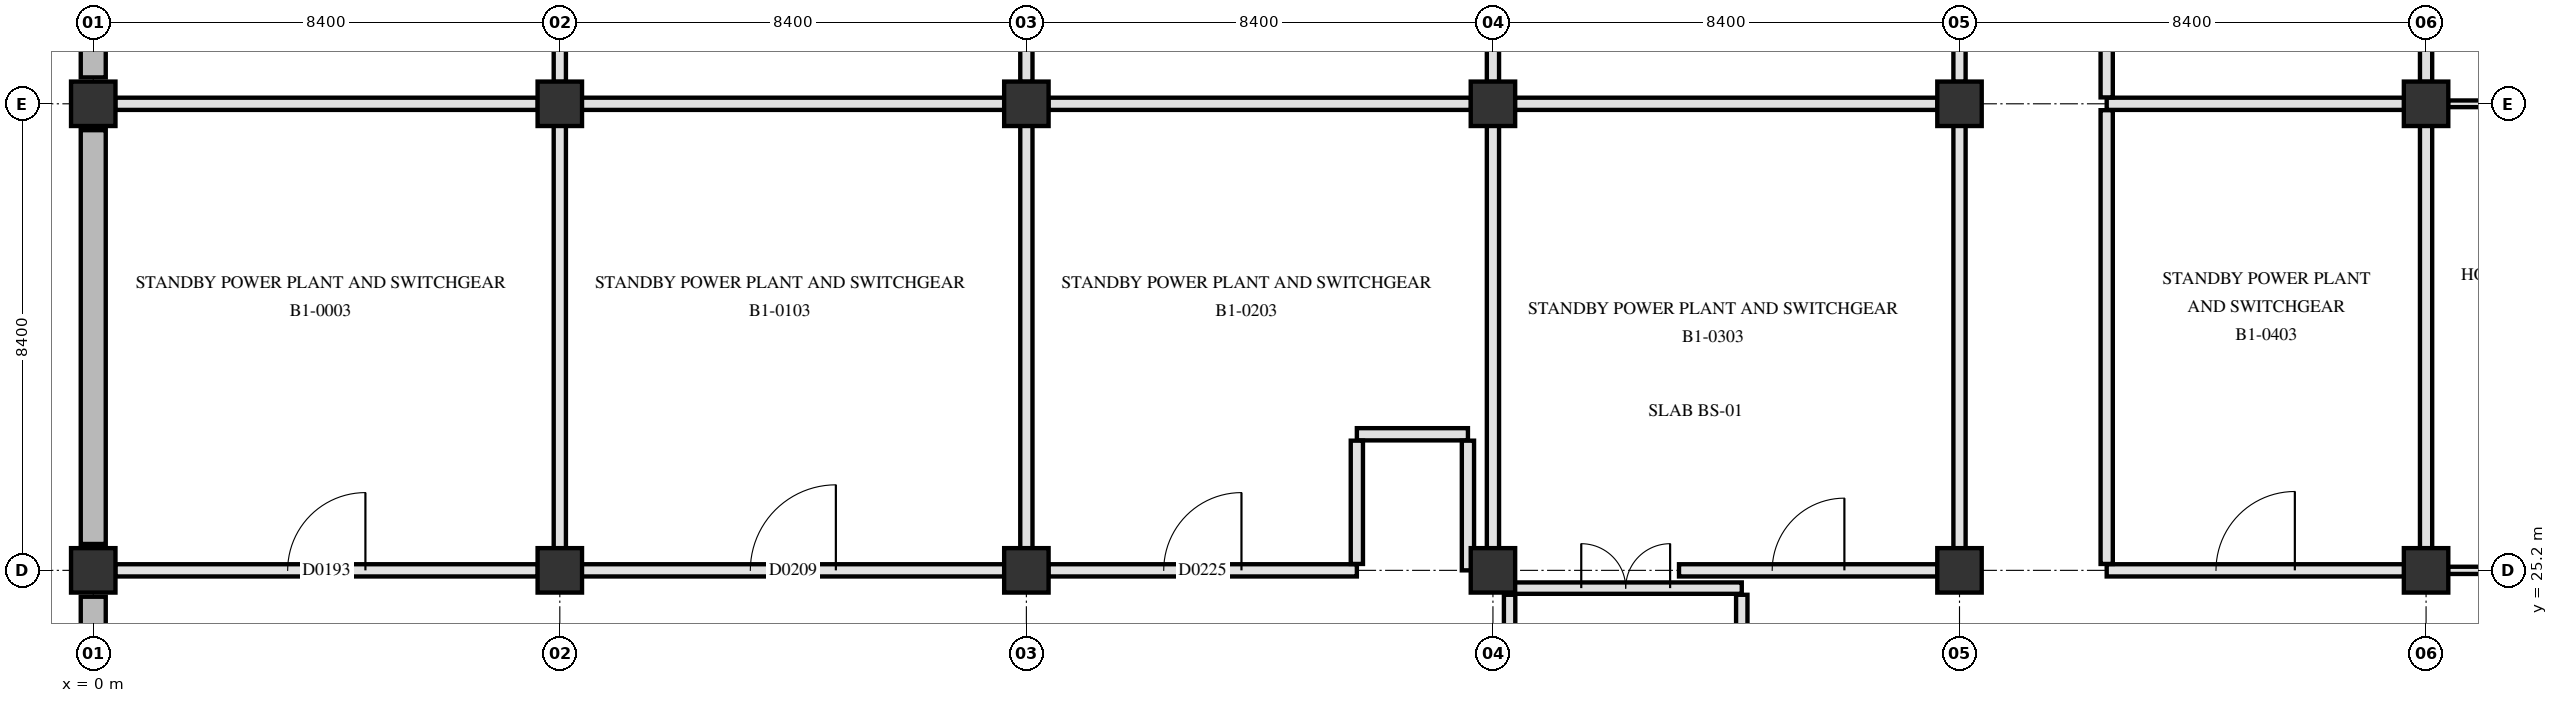
"""IFC4 building model, lengths in metres.
Left out: names, types, materials, properties, quantities, classifications, styles, units other than length and angle.
Written with IfcOpenShell. Run it as: python <this file> out.ifc"""

import sys

from ifc_helpers import new_model, si_unit, direction, frame, frame_2d, origin, origin_2d, place, context, subcontext, project, spatial, rectangle, extrude, element, fill, save


model = new_model("IFC4")
c1 = context("Model", 3, precision=1e-05, world=origin(), true_north=direction((0.0, 1.0)))
c2 = subcontext(c1, "Body", "Model", "MODEL_VIEW")
j1 = project(units=[si_unit("LENGTHUNIT", "METRE"), si_unit("PLANEANGLEUNIT", "RADIAN")], contexts=[c1])
p1 = place(None, origin())
s1 = spatial("IfcSite", under=j1, at=p1, CompositionType="ELEMENT")
p2 = place(p1, origin())
s2 = spatial("IfcBuilding", under=s1, at=p2, CompositionType="ELEMENT")
p3 = place(p2, frame((0.0, 0.0, -5.4)))
s3 = spatial("IfcBuildingStorey", under=s2, at=p3, CompositionType="ELEMENT", Elevation=-5.4)
for number, where, z_axis, x_axis in (
    (1, (0.0, 25.2, 0.0), (0.0, 0.0, 1.0), (1.0, 0.0, 0.0)),
    (2, (0.0, 33.6, 0.0), (0.0, 0.0, 1.0), (1.0, 0.0, 0.0)),
    (3, (8.4, 25.2, 0.0), (0.0, 0.0, 1.0), (1.0, 0.0, 0.0)),
    (4, (8.4, 33.6, 0.0), (0.0, 0.0, 1.0), (1.0, 0.0, 0.0)),
    (5, (16.8, 25.2, 0.0), (0.0, 0.0, 1.0), (1.0, 0.0, 0.0)),
    (6, (16.8, 33.6, 0.0), (0.0, 0.0, 1.0), (1.0, 0.0, 0.0)),
    (7, (25.2, 25.2, 0.0), (0.0, 0.0, 1.0), (1.0, 0.0, 0.0)),
    (8, (25.2, 33.6, 0.0), (0.0, 0.0, 1.0), (1.0, 0.0, 0.0)),
    (9, (33.6, 25.2, 0.0), (0.0, 0.0, 1.0), (1.0, 0.0, 0.0)),
    (10, (33.6, 33.6, 0.0), (0.0, 0.0, 1.0), (1.0, 0.0, 0.0)),
    (11, (42.0, 25.2, 0.0), (0.0, 0.0, 1.0), (1.0, 0.0, 0.0)),
    (12, (42.0, 33.6, 0.0), (0.0, 0.0, 1.0), (1.0, 0.0, 0.0)),
):
    element("IfcColumn", number, at=place(p3, frame(where, z_axis=z_axis, x_axis=x_axis)), inside=s3, PredefinedType="COLUMN", context=c2, shape_type="SweptSolid", body=[
        extrude(rectangle(XDim=0.8, YDim=0.8, at=origin_2d()), origin(), (0.0, 0.0, 1.0), 5.4),
    ])
p4 = place(p3, frame((0.0, 17.275, 0.0), z_axis=(0.0, 0.0, 1.0), x_axis=(0.0, 1.0, 0.0)))
e13 = element("IfcWall", 13, at=p4, inside=s3, PredefinedType="SOLIDWALL", context=c2, shape_type="SweptSolid", body=[
    extrude(rectangle(XDim=7.45, YDim=0.45, at=frame_2d((3.725, 0.0))), origin(), (0.0, 0.0, 1.0), 5.08),
])
for number, where, z_axis, x_axis in (
    (14, (0.0, 25.675, 0.0), (0.0, 0.0, 1.0), (0.0, 1.0, 0.0)),
    (15, (0.0, 34.075, 0.0), (0.0, 0.0, 1.0), (0.0, 1.0, 0.0)),
):
    element("IfcWall", number, at=place(p3, frame(where, z_axis=z_axis, x_axis=x_axis)), inside=s3, PredefinedType="SOLIDWALL", context=c2, shape_type="SweptSolid", body=[
        extrude(rectangle(XDim=7.45, YDim=0.45, at=frame_2d((3.725, 0.0))), origin(), (0.0, 0.0, 1.0), 5.08),
    ])
p5 = place(p3, frame((29.68, 20.64, 0.0), z_axis=(0.0, 0.0, 1.0), x_axis=(0.0, 1.0, 0.0)))
e16 = element("IfcWall", 16, at=p5, inside=s3, PredefinedType="PARTITIONING", context=c2, shape_type="SweptSolid", body=[
    extrude(rectangle(XDim=4.12, YDim=0.205, at=frame_2d((2.06, 0.0))), origin(), (0.0, 0.0, 1.0), 5.07),
])
p6 = place(p3, frame((25.5, 20.64, 0.0), z_axis=(0.0, 0.0, 1.0), x_axis=(0.0, 1.0, 0.0)))
e17 = element("IfcWall", 17, at=p6, inside=s3, PredefinedType="PARTITIONING", context=c2, shape_type="SweptSolid", body=[
    extrude(rectangle(XDim=4.12, YDim=0.205, at=frame_2d((2.06, 0.0))), origin(), (0.0, 0.0, 1.0), 4.47),
])
p7 = place(p3, frame((25.5, 24.88, 0.0), z_axis=(0.0, 0.0, 1.0), x_axis=(1.0, 0.0, 0.0)))
e18 = element("IfcWall", 18, at=p7, inside=s3, PredefinedType="PARTITIONING", context=c2, shape_type="SweptSolid", body=[
    extrude(rectangle(XDim=4.18, YDim=0.205, at=frame_2d((2.09, 0.0))), origin(), (0.0, 0.0, 1.0), 4.42),
])
p8 = place(p7, frame((1.29, 0.0, 0.0)))
e19 = element("IfcOpeningElement", 19, at=p8, cuts=e18, PredefinedType="OPENING", context=c2, shape_type="SweptSolid", body=[
    extrude(rectangle(XDim=1.6, YDim=2.25, at=frame_2d((0.8, 1.125))), frame((0.0, 0.113, 0.0), z_axis=(0.0, -1.0, 0.0), x_axis=(1.0, 0.0, 0.0)), (0.0, 0.0, 1.0), 0.225),
])
p9 = place(p3, frame((0.395, 25.2, 0.0), z_axis=(0.0, 0.0, 1.0), x_axis=(1.0, 0.0, 0.0)))
e20 = element("IfcWall", 20, at=p9, inside=s3, PredefinedType="PARTITIONING", context=c2, shape_type="SweptSolid", body=[
    extrude(rectangle(XDim=7.61, YDim=0.22, at=frame_2d((3.805, 0.0))), origin(), (0.0, 0.0, 1.0), 4.42),
])
p10 = place(p9, frame((3.105, 0.0, 0.0)))
e21 = element("IfcOpeningElement", 21, at=p10, cuts=e20, PredefinedType="OPENING", context=c2, shape_type="SweptSolid", body=[
    extrude(rectangle(XDim=1.4, YDim=2.2, at=frame_2d((0.7, 1.1))), frame((0.0, 0.12, 0.0), z_axis=(0.0, -1.0, 0.0), x_axis=(1.0, 0.0, 0.0)), (0.0, 0.0, 1.0), 0.24),
])
p11 = place(p3, frame((8.795, 25.2, 0.0), z_axis=(0.0, 0.0, 1.0), x_axis=(1.0, 0.0, 0.0)))
e22 = element("IfcWall", 22, at=p11, inside=s3, PredefinedType="PARTITIONING", context=c2, shape_type="SweptSolid", body=[
    extrude(rectangle(XDim=7.61, YDim=0.22, at=frame_2d((3.805, 0.0))), origin(), (0.0, 0.0, 1.0), 4.42),
])
p12 = place(p11, frame((3.035, 0.0, 0.0)))
e23 = element("IfcOpeningElement", 23, at=p12, cuts=e22, PredefinedType="OPENING", context=c2, shape_type="SweptSolid", body=[
    extrude(rectangle(XDim=1.54, YDim=2.24, at=frame_2d((0.77, 1.12))), frame((0.0, 0.12, 0.0), z_axis=(0.0, -1.0, 0.0), x_axis=(1.0, 0.0, 0.0)), (0.0, 0.0, 1.0), 0.24),
])
p13 = place(p3, frame((17.195, 25.2, 0.0), z_axis=(0.0, 0.0, 1.0), x_axis=(1.0, 0.0, 0.0)))
e24 = element("IfcWall", 24, at=p13, inside=s3, PredefinedType="PARTITIONING", context=c2, shape_type="SweptSolid", body=[
    extrude(rectangle(XDim=5.555, YDim=0.22, at=frame_2d((2.777, 0.0))), origin(), (0.0, 0.0, 1.0), 4.42),
])
p14 = place(p13, frame((2.077, 0.0, 0.0)))
e25 = element("IfcOpeningElement", 25, at=p14, cuts=e24, PredefinedType="OPENING", context=c2, shape_type="SweptSolid", body=[
    extrude(rectangle(XDim=1.4, YDim=2.2, at=frame_2d((0.7, 1.1))), frame((0.0, 0.12, 0.0), z_axis=(0.0, -1.0, 0.0), x_axis=(1.0, 0.0, 0.0)), (0.0, 0.0, 1.0), 0.24),
])
p15 = place(p3, frame((28.55, 25.2, 0.0), z_axis=(0.0, 0.0, 1.0), x_axis=(1.0, 0.0, 0.0)))
e26 = element("IfcWall", 26, at=p15, inside=s3, PredefinedType="PARTITIONING", context=c2, shape_type="SweptSolid", body=[
    extrude(rectangle(XDim=4.655, YDim=0.22, at=frame_2d((2.328, 0.0))), origin(), (0.0, 0.0, 1.0), 4.42),
])
p16 = place(p15, frame((1.677, 0.0, 0.0)))
e27 = element("IfcOpeningElement", 27, at=p16, cuts=e26, PredefinedType="OPENING", context=c2, shape_type="SweptSolid", body=[
    extrude(rectangle(XDim=1.3, YDim=2.2, at=frame_2d((0.65, 1.1))), frame((0.0, 0.12, 0.0), z_axis=(0.0, -1.0, 0.0), x_axis=(1.0, 0.0, 0.0)), (0.0, 0.0, 1.0), 0.24),
])
p17 = place(p3, frame((36.25, 25.2, 0.0), z_axis=(0.0, 0.0, 1.0), x_axis=(1.0, 0.0, 0.0)))
e28 = element("IfcWall", 28, at=p17, inside=s3, PredefinedType="PARTITIONING", context=c2, shape_type="SweptSolid", body=[
    extrude(rectangle(XDim=5.355, YDim=0.22, at=frame_2d((2.677, 0.0))), origin(), (0.0, 0.0, 1.0), 4.42),
])
p18 = place(p17, frame((1.968, 0.0, 0.0)))
e29 = element("IfcOpeningElement", 29, at=p18, cuts=e28, PredefinedType="OPENING", context=c2, shape_type="SweptSolid", body=[
    extrude(rectangle(XDim=1.42, YDim=2.22, at=frame_2d((0.71, 1.11))), frame((0.0, 0.12, 0.0), z_axis=(0.0, -1.0, 0.0), x_axis=(1.0, 0.0, 0.0)), (0.0, 0.0, 1.0), 0.24),
])
p19 = place(p3, frame((42.395, 25.2, 0.0), z_axis=(0.0, 0.0, 1.0), x_axis=(1.0, 0.0, 0.0)))
e30 = element("IfcWall", 30, at=p19, inside=s3, PredefinedType="PARTITIONING", context=c2, shape_type="SweptSolid", body=[
    extrude(rectangle(XDim=5.555, YDim=0.13, at=frame_2d((2.777, 0.0))), origin(), (0.0, 0.0, 1.0), 4.42),
])
p20 = place(p19, frame((2.153, 0.0, 0.0)))
e31 = element("IfcOpeningElement", 31, at=p20, cuts=e30, PredefinedType="OPENING", context=c2, shape_type="SweptSolid", body=[
    extrude(rectangle(XDim=1.25, YDim=2.2, at=frame_2d((0.625, 1.1))), frame((0.0, 0.075, 0.0), z_axis=(0.0, -1.0, 0.0), x_axis=(1.0, 0.0, 0.0)), (0.0, 0.0, 1.0), 0.15),
])
p21 = place(p3, frame((22.75, 27.65, 0.0), z_axis=(0.0, 0.0, 1.0), x_axis=(1.0, 0.0, 0.0)))
e32 = element("IfcWall", 32, at=p21, inside=s3, PredefinedType="PARTITIONING", context=c2, shape_type="SweptSolid", body=[
    extrude(rectangle(XDim=2.0, YDim=0.22, at=frame_2d((1.0, 0.0))), origin(), (0.0, 0.0, 1.0), 5.07),
])
p22 = place(p3, frame((0.395, 33.6, 0.0), z_axis=(0.0, 0.0, 1.0), x_axis=(1.0, 0.0, 0.0)))
e33 = element("IfcWall", 33, at=p22, inside=s3, PredefinedType="PARTITIONING", context=c2, shape_type="SweptSolid", body=[
    extrude(rectangle(XDim=7.61, YDim=0.22, at=frame_2d((3.805, 0.0))), origin(), (0.0, 0.0, 1.0), 4.42),
])
p23 = place(p3, frame((8.795, 33.6, 0.0), z_axis=(0.0, 0.0, 1.0), x_axis=(1.0, 0.0, 0.0)))
e34 = element("IfcWall", 34, at=p23, inside=s3, PredefinedType="PARTITIONING", context=c2, shape_type="SweptSolid", body=[
    extrude(rectangle(XDim=7.61, YDim=0.22, at=frame_2d((3.805, 0.0))), origin(), (0.0, 0.0, 1.0), 4.42),
])
p24 = place(p3, frame((17.195, 33.6, 0.0), z_axis=(0.0, 0.0, 1.0), x_axis=(1.0, 0.0, 0.0)))
e35 = element("IfcWall", 35, at=p24, inside=s3, PredefinedType="PARTITIONING", context=c2, shape_type="SweptSolid", body=[
    extrude(rectangle(XDim=7.61, YDim=0.22, at=frame_2d((3.805, 0.0))), origin(), (0.0, 0.0, 1.0), 4.42),
])
p25 = place(p3, frame((25.595, 33.6, 0.0), z_axis=(0.0, 0.0, 1.0), x_axis=(1.0, 0.0, 0.0)))
e36 = element("IfcWall", 36, at=p25, inside=s3, PredefinedType="PARTITIONING", context=c2, shape_type="SweptSolid", body=[
    extrude(rectangle(XDim=7.61, YDim=0.22, at=frame_2d((3.805, 0.0))), origin(), (0.0, 0.0, 1.0), 4.42),
])
p26 = place(p3, frame((36.25, 33.6, 0.0), z_axis=(0.0, 0.0, 1.0), x_axis=(1.0, 0.0, 0.0)))
e37 = element("IfcWall", 37, at=p26, inside=s3, PredefinedType="PARTITIONING", context=c2, shape_type="SweptSolid", body=[
    extrude(rectangle(XDim=5.355, YDim=0.22, at=frame_2d((2.677, 0.0))), origin(), (0.0, 0.0, 1.0), 4.42),
])
p27 = place(p3, frame((42.395, 33.6, 0.0), z_axis=(0.0, 0.0, 1.0), x_axis=(1.0, 0.0, 0.0)))
e38 = element("IfcWall", 38, at=p27, inside=s3, PredefinedType="PARTITIONING", context=c2, shape_type="SweptSolid", body=[
    extrude(rectangle(XDim=7.61, YDim=0.12, at=frame_2d((3.805, 0.0))), origin(), (0.0, 0.0, 1.0), 4.42),
])
p28 = place(p3, frame((8.4, 25.595, 0.0), z_axis=(0.0, 0.0, 1.0), x_axis=(0.0, 1.0, 0.0)))
e39 = element("IfcWall", 39, at=p28, inside=s3, PredefinedType="PARTITIONING", context=c2, shape_type="SweptSolid", body=[
    extrude(rectangle(XDim=7.61, YDim=0.22, at=frame_2d((3.805, 0.0))), origin(), (0.0, 0.0, 1.0), 4.47),
])
p29 = place(p3, frame((8.4, 33.995, 0.0), z_axis=(0.0, 0.0, 1.0), x_axis=(0.0, 1.0, 0.0)))
e40 = element("IfcWall", 40, at=p29, inside=s3, PredefinedType="PARTITIONING", context=c2, shape_type="SweptSolid", body=[
    extrude(rectangle(XDim=7.61, YDim=0.22, at=frame_2d((3.805, 0.0))), origin(), (0.0, 0.0, 1.0), 4.47),
])
p30 = place(p3, frame((16.8, 25.595, 0.0), z_axis=(0.0, 0.0, 1.0), x_axis=(0.0, 1.0, 0.0)))
e41 = element("IfcWall", 41, at=p30, inside=s3, PredefinedType="PARTITIONING", context=c2, shape_type="SweptSolid", body=[
    extrude(rectangle(XDim=7.61, YDim=0.22, at=frame_2d((3.805, 0.0))), origin(), (0.0, 0.0, 1.0), 4.47),
])
p31 = place(p3, frame((16.8, 33.995, 0.0), z_axis=(0.0, 0.0, 1.0), x_axis=(0.0, 1.0, 0.0)))
e42 = element("IfcWall", 42, at=p31, inside=s3, PredefinedType="PARTITIONING", context=c2, shape_type="SweptSolid", body=[
    extrude(rectangle(XDim=7.61, YDim=0.22, at=frame_2d((3.805, 0.0))), origin(), (0.0, 0.0, 1.0), 4.47),
])
p32 = place(p3, frame((22.75, 25.315, 0.0), z_axis=(0.0, 0.0, 1.0), x_axis=(0.0, 1.0, 0.0)))
e43 = element("IfcWall", 43, at=p32, inside=s3, PredefinedType="PARTITIONING", context=c2, shape_type="SweptSolid", body=[
    extrude(rectangle(XDim=2.22, YDim=0.22, at=frame_2d((1.11, 0.0))), origin(), (0.0, 0.0, 1.0), 4.42),
])
p33 = place(p3, frame((24.75, 25.2, 0.0), z_axis=(0.0, 0.0, 1.0), x_axis=(0.0, 1.0, 0.0)))
e44 = element("IfcWall", 44, at=p33, inside=s3, PredefinedType="PARTITIONING", context=c2, shape_type="SweptSolid", body=[
    extrude(rectangle(XDim=2.335, YDim=0.22, at=frame_2d((1.167, 0.0))), origin(), (0.0, 0.0, 1.0), 4.42),
])
p34 = place(p3, frame((25.2, 25.595, 0.0), z_axis=(0.0, 0.0, 1.0), x_axis=(0.0, 1.0, 0.0)))
e45 = element("IfcWall", 45, at=p34, inside=s3, PredefinedType="PARTITIONING", context=c2, shape_type="SweptSolid", body=[
    extrude(rectangle(XDim=7.61, YDim=0.22, at=frame_2d((3.805, 0.0))), origin(), (0.0, 0.0, 1.0), 4.47),
])
p35 = place(p3, frame((25.2, 33.995, 0.0), z_axis=(0.0, 0.0, 1.0), x_axis=(0.0, 1.0, 0.0)))
e46 = element("IfcWall", 46, at=p35, inside=s3, PredefinedType="PARTITIONING", context=c2, shape_type="SweptSolid", body=[
    extrude(rectangle(XDim=7.61, YDim=0.22, at=frame_2d((3.805, 0.0))), origin(), (0.0, 0.0, 1.0), 4.47),
])
p36 = place(p3, frame((33.6, 25.595, 0.0), z_axis=(0.0, 0.0, 1.0), x_axis=(0.0, 1.0, 0.0)))
e47 = element("IfcWall", 47, at=p36, inside=s3, PredefinedType="PARTITIONING", context=c2, shape_type="SweptSolid", body=[
    extrude(rectangle(XDim=7.61, YDim=0.22, at=frame_2d((3.805, 0.0))), origin(), (0.0, 0.0, 1.0), 4.47),
])
p37 = place(p3, frame((33.6, 33.995, 0.0), z_axis=(0.0, 0.0, 1.0), x_axis=(0.0, 1.0, 0.0)))
e48 = element("IfcWall", 48, at=p37, inside=s3, PredefinedType="PARTITIONING", context=c2, shape_type="SweptSolid", body=[
    extrude(rectangle(XDim=7.61, YDim=0.22, at=frame_2d((3.805, 0.0))), origin(), (0.0, 0.0, 1.0), 4.47),
])
p38 = place(p3, frame((36.25, 25.315, 0.0), z_axis=(0.0, 0.0, 1.0), x_axis=(0.0, 1.0, 0.0)))
e49 = element("IfcWall", 49, at=p38, inside=s3, PredefinedType="PARTITIONING", context=c2, shape_type="SweptSolid", body=[
    extrude(rectangle(XDim=8.17, YDim=0.22, at=frame_2d((4.085, 0.0))), origin(), (0.0, 0.0, 1.0), 4.42),
])
p39 = place(p3, frame((36.25, 33.715, 0.0), z_axis=(0.0, 0.0, 1.0), x_axis=(0.0, 1.0, 0.0)))
e50 = element("IfcWall", 50, at=p39, inside=s3, PredefinedType="PARTITIONING", context=c2, shape_type="SweptSolid", body=[
    extrude(rectangle(XDim=8.17, YDim=0.22, at=frame_2d((4.085, 0.0))), origin(), (0.0, 0.0, 1.0), 4.42),
])
p40 = place(p3, frame((42.0, 25.595, 0.0), z_axis=(0.0, 0.0, 1.0), x_axis=(0.0, 1.0, 0.0)))
e51 = element("IfcWall", 51, at=p40, inside=s3, PredefinedType="PARTITIONING", context=c2, shape_type="SweptSolid", body=[
    extrude(rectangle(XDim=7.61, YDim=0.22, at=frame_2d((3.805, 0.0))), origin(), (0.0, 0.0, 1.0), 4.47),
])
p41 = place(p3, frame((42.0, 33.995, 0.0), z_axis=(0.0, 0.0, 1.0), x_axis=(0.0, 1.0, 0.0)))
e52 = element("IfcWall", 52, at=p41, inside=s3, PredefinedType="PARTITIONING", context=c2, shape_type="SweptSolid", body=[
    extrude(rectangle(XDim=7.61, YDim=0.22, at=frame_2d((3.805, 0.0))), origin(), (0.0, 0.0, 1.0), 4.47),
])
p42 = place(p8, origin())
e53 = element("IfcDoor", 53, at=p42, inside=s3, OperationType="DOUBLE_SWING_LEFT", PredefinedType="DOOR", context=c2, shape_type="SweptSolid", body=[
    extrude(rectangle(XDim=1.6, YDim=2.25, at=frame_2d((0.8, 1.125))), frame((0.0, 0.025, 0.0), z_axis=(0.0, -1.0, 0.0), x_axis=(1.0, 0.0, 0.0)), (0.0, 0.0, 1.0), 0.05),
])
fill(e19, e53)
p43 = place(p10, origin())
e54 = element("IfcDoor", 54, at=p43, inside=s3, OperationType="SINGLE_SWING_RIGHT", PredefinedType="DOOR", context=c2, shape_type="SweptSolid", body=[
    extrude(rectangle(XDim=1.4, YDim=2.2, at=frame_2d((0.7, 1.1))), frame((0.0, 0.025, 0.0), z_axis=(0.0, -1.0, 0.0), x_axis=(1.0, 0.0, 0.0)), (0.0, 0.0, 1.0), 0.05),
])
fill(e21, e54)
p44 = place(p12, origin())
e55 = element("IfcDoor", 55, at=p44, inside=s3, OperationType="SINGLE_SWING_RIGHT", PredefinedType="DOOR", context=c2, shape_type="SweptSolid", body=[
    extrude(rectangle(XDim=1.54, YDim=2.24, at=frame_2d((0.77, 1.12))), frame((0.0, 0.025, 0.0), z_axis=(0.0, -1.0, 0.0), x_axis=(1.0, 0.0, 0.0)), (0.0, 0.0, 1.0), 0.05),
])
fill(e23, e55)
p45 = place(p14, origin())
e56 = element("IfcDoor", 56, at=p45, inside=s3, OperationType="SINGLE_SWING_RIGHT", PredefinedType="DOOR", context=c2, shape_type="SweptSolid", body=[
    extrude(rectangle(XDim=1.4, YDim=2.2, at=frame_2d((0.7, 1.1))), frame((0.0, 0.025, 0.0), z_axis=(0.0, -1.0, 0.0), x_axis=(1.0, 0.0, 0.0)), (0.0, 0.0, 1.0), 0.05),
])
fill(e25, e56)
p46 = place(p16, origin())
e57 = element("IfcDoor", 57, at=p46, inside=s3, OperationType="SINGLE_SWING_RIGHT", PredefinedType="DOOR", context=c2, shape_type="SweptSolid", body=[
    extrude(rectangle(XDim=1.3, YDim=2.2, at=frame_2d((0.65, 1.1))), frame((0.0, 0.025, 0.0), z_axis=(0.0, -1.0, 0.0), x_axis=(1.0, 0.0, 0.0)), (0.0, 0.0, 1.0), 0.05),
])
fill(e27, e57)
p47 = place(p18, origin())
e58 = element("IfcDoor", 58, at=p47, inside=s3, OperationType="SINGLE_SWING_RIGHT", PredefinedType="DOOR", context=c2, shape_type="SweptSolid", body=[
    extrude(rectangle(XDim=1.42, YDim=2.22, at=frame_2d((0.71, 1.11))), frame((0.0, 0.025, 0.0), z_axis=(0.0, -1.0, 0.0), x_axis=(1.0, 0.0, 0.0)), (0.0, 0.0, 1.0), 0.05),
])
fill(e29, e58)
save(model, sys.argv[1])
